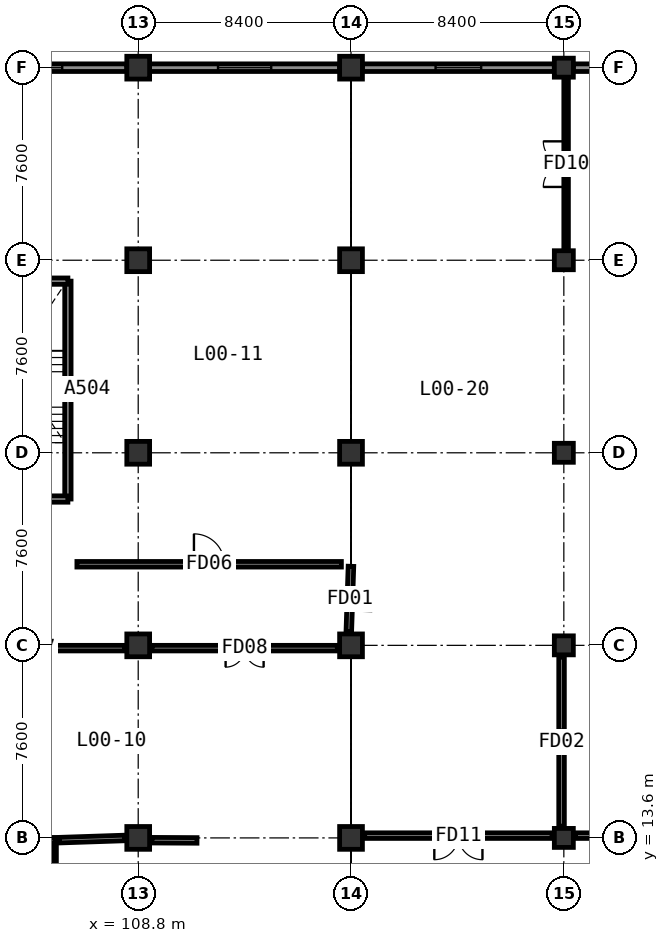
"""IFC4 building model, lengths in metres.
Left out: names, types, materials, properties, quantities, classifications, styles, units other than length and angle.
Written with IfcOpenShell. Run it as: python <this file> out.ifc"""

import sys

from ifc_helpers import new_model, si_unit, direction, frame, frame_2d, origin, origin_2d, place, context, subcontext, project, spatial, rectangle, extrude, element, fill, save


model = new_model("IFC4")
c1 = context("Model", 3, precision=1e-05, world=origin(), true_north=direction((0.0, 1.0)))
c2 = subcontext(c1, "Body", "Model", "MODEL_VIEW")
j1 = project(units=[si_unit("LENGTHUNIT", "METRE"), si_unit("PLANEANGLEUNIT", "RADIAN")], contexts=[c1])
p1 = place(None, origin())
s1 = spatial("IfcSite", under=j1, at=p1, CompositionType="ELEMENT")
p2 = place(p1, origin())
s2 = spatial("IfcBuilding", under=s1, at=p2, CompositionType="ELEMENT")
p3 = place(p2, origin())
s3 = spatial("IfcBuildingStorey", under=s2, at=p3, CompositionType="ELEMENT", Elevation=0.0)
for number, where, z_axis, x_axis in (
    (1, (108.8, 13.6, 0.0), (0.0, 0.0, 1.0), (1.0, 0.0, 0.0)),
    (2, (117.2, 13.6, 0.0), (0.0, 0.0, 1.0), (1.0, 0.0, 0.0)),
):
    element("IfcColumn", number, at=place(p3, frame(where, z_axis=z_axis, x_axis=x_axis)), inside=s3, PredefinedType="COLUMN", context=c2, shape_type="SweptSolid", body=[
        extrude(rectangle(XDim=0.9, YDim=0.9, at=origin_2d()), origin(), (0.0, 0.0, 1.0), 4.8),
    ])
p4 = place(p3, frame((125.6, 13.6, 0.0), z_axis=(0.0, 0.0, 1.0), x_axis=(1.0, 0.0, 0.0)))
e3 = element("IfcColumn", 3, at=p4, inside=s3, PredefinedType="COLUMN", context=c2, shape_type="SweptSolid", body=[
    extrude(rectangle(XDim=0.75, YDim=0.75, at=origin_2d()), origin(), (0.0, 0.0, 1.0), 4.8),
])
for number, where, z_axis, x_axis in (
    (4, (108.8, 21.2, 0.0), (0.0, 0.0, 1.0), (1.0, 0.0, 0.0)),
    (5, (117.2, 21.2, 0.0), (0.0, 0.0, 1.0), (1.0, 0.0, 0.0)),
):
    element("IfcColumn", number, at=place(p3, frame(where, z_axis=z_axis, x_axis=x_axis)), inside=s3, PredefinedType="COLUMN", context=c2, shape_type="SweptSolid", body=[
        extrude(rectangle(XDim=0.9, YDim=0.9, at=origin_2d()), origin(), (0.0, 0.0, 1.0), 4.8),
    ])
p5 = place(p3, frame((125.6, 21.2, 0.0), z_axis=(0.0, 0.0, 1.0), x_axis=(1.0, 0.0, 0.0)))
e6 = element("IfcColumn", 6, at=p5, inside=s3, PredefinedType="COLUMN", context=c2, shape_type="SweptSolid", body=[
    extrude(rectangle(XDim=0.75, YDim=0.75, at=origin_2d()), origin(), (0.0, 0.0, 1.0), 4.8),
])
for number, where, z_axis, x_axis in (
    (7, (108.8, 28.8, 0.0), (0.0, 0.0, 1.0), (1.0, 0.0, 0.0)),
    (8, (117.2, 28.8, 0.0), (0.0, 0.0, 1.0), (1.0, 0.0, 0.0)),
):
    element("IfcColumn", number, at=place(p3, frame(where, z_axis=z_axis, x_axis=x_axis)), inside=s3, PredefinedType="COLUMN", context=c2, shape_type="SweptSolid", body=[
        extrude(rectangle(XDim=0.9, YDim=0.9, at=origin_2d()), origin(), (0.0, 0.0, 1.0), 4.8),
    ])
p6 = place(p3, frame((125.6, 28.8, 0.0), z_axis=(0.0, 0.0, 1.0), x_axis=(1.0, 0.0, 0.0)))
e9 = element("IfcColumn", 9, at=p6, inside=s3, PredefinedType="COLUMN", context=c2, shape_type="SweptSolid", body=[
    extrude(rectangle(XDim=0.75, YDim=0.75, at=origin_2d()), origin(), (0.0, 0.0, 1.0), 4.8),
])
for number, where, z_axis, x_axis in (
    (10, (108.8, 36.4, 0.0), (0.0, 0.0, 1.0), (1.0, 0.0, 0.0)),
    (11, (117.2, 36.4, 0.0), (0.0, 0.0, 1.0), (1.0, 0.0, 0.0)),
):
    element("IfcColumn", number, at=place(p3, frame(where, z_axis=z_axis, x_axis=x_axis)), inside=s3, PredefinedType="COLUMN", context=c2, shape_type="SweptSolid", body=[
        extrude(rectangle(XDim=0.9, YDim=0.9, at=origin_2d()), origin(), (0.0, 0.0, 1.0), 4.8),
    ])
p7 = place(p3, frame((125.6, 36.4, 0.0), z_axis=(0.0, 0.0, 1.0), x_axis=(1.0, 0.0, 0.0)))
e12 = element("IfcColumn", 12, at=p7, inside=s3, PredefinedType="COLUMN", context=c2, shape_type="SweptSolid", body=[
    extrude(rectangle(XDim=0.75, YDim=0.75, at=origin_2d()), origin(), (0.0, 0.0, 1.0), 4.8),
])
for number, where, z_axis, x_axis in (
    (13, (108.8, 44.0, 0.0), (0.0, 0.0, 1.0), (1.0, 0.0, 0.0)),
    (14, (117.2, 44.0, 0.0), (0.0, 0.0, 1.0), (1.0, 0.0, 0.0)),
):
    element("IfcColumn", number, at=place(p3, frame(where, z_axis=z_axis, x_axis=x_axis)), inside=s3, PredefinedType="COLUMN", context=c2, shape_type="SweptSolid", body=[
        extrude(rectangle(XDim=0.9, YDim=0.9, at=origin_2d()), origin(), (0.0, 0.0, 1.0), 4.8),
    ])
p8 = place(p3, frame((125.6, 44.0, 0.0), z_axis=(0.0, 0.0, 1.0), x_axis=(1.0, 0.0, 0.0)))
e15 = element("IfcColumn", 15, at=p8, inside=s3, PredefinedType="COLUMN", context=c2, shape_type="SweptSolid", body=[
    extrude(rectangle(XDim=0.75, YDim=0.75, at=origin_2d()), origin(), (0.0, 0.0, 1.0), 4.8),
])
p9 = place(p3, frame((133.625, 44.0, 0.0), z_axis=(0.0, 0.0, 1.0), x_axis=(-1.0, 0.0, 0.0)))
e16 = element("IfcWall", 16, at=p9, inside=s3, PredefinedType="SOLIDWALL", context=c2, shape_type="SweptSolid", body=[
    extrude(rectangle(XDim=7.65, YDim=0.3, at=frame_2d((3.825, 0.0))), origin(), (0.0, 0.0, 1.0), 4.187),
])
p10 = place(p9, frame((3.0, 0.0, 0.95)))
e17 = element("IfcOpeningElement", 17, at=p10, cuts=e16, PredefinedType="OPENING", context=c2, shape_type="SweptSolid", body=[
    extrude(rectangle(XDim=1.65, YDim=1.8, at=frame_2d((0.825, 0.9))), frame((0.0, 0.16, 0.0), z_axis=(0.0, -1.0, 0.0), x_axis=(1.0, 0.0, 0.0)), (0.0, 0.0, 1.0), 0.32),
])
p11 = place(p3, frame((125.225, 44.0, 0.0), z_axis=(0.0, 0.0, 1.0), x_axis=(-1.0, 0.0, 0.0)))
e18 = element("IfcWall", 18, at=p11, inside=s3, PredefinedType="SOLIDWALL", context=c2, shape_type="SweptSolid", body=[
    extrude(rectangle(XDim=7.575, YDim=0.3, at=frame_2d((3.788, 0.0))), origin(), (0.0, 0.0, 1.0), 4.047),
])
p12 = place(p11, frame((2.887, 0.0, 0.95)))
e19 = element("IfcOpeningElement", 19, at=p12, cuts=e18, PredefinedType="OPENING", context=c2, shape_type="SweptSolid", body=[
    extrude(rectangle(XDim=1.8, YDim=1.8, at=frame_2d((0.9, 0.9))), frame((0.0, 0.16, 0.0), z_axis=(0.0, -1.0, 0.0), x_axis=(1.0, 0.0, 0.0)), (0.0, 0.0, 1.0), 0.32),
])
p13 = place(p3, frame((116.75, 44.0, 0.0), z_axis=(0.0, 0.0, 1.0), x_axis=(-1.0, 0.0, 0.0)))
e20 = element("IfcWall", 20, at=p13, inside=s3, PredefinedType="SOLIDWALL", context=c2, shape_type="SweptSolid", body=[
    extrude(rectangle(XDim=7.5, YDim=0.3, at=frame_2d((3.75, 0.0))), origin(), (0.0, 0.0, 1.0), 4.047),
])
p14 = place(p13, frame((2.7, 0.0, 0.95)))
e21 = element("IfcOpeningElement", 21, at=p14, cuts=e20, PredefinedType="OPENING", context=c2, shape_type="SweptSolid", body=[
    extrude(rectangle(XDim=2.1, YDim=1.8, at=frame_2d((1.05, 0.9))), frame((0.0, 0.16, 0.0), z_axis=(0.0, -1.0, 0.0), x_axis=(1.0, 0.0, 0.0)), (0.0, 0.0, 1.0), 0.32),
])
p15 = place(p3, frame((108.35, 44.0, 0.0), z_axis=(0.0, 0.0, 1.0), x_axis=(-1.0, 0.0, 0.0)))
e22 = element("IfcWall", 22, at=p15, inside=s3, PredefinedType="SOLIDWALL", context=c2, shape_type="SweptSolid", body=[
    extrude(rectangle(XDim=7.5, YDim=0.3, at=frame_2d((3.75, 0.0))), origin(), (0.0, 0.0, 1.0), 4.047),
])
p16 = place(p15, frame((2.55, 0.0, 0.95)))
e23 = element("IfcOpeningElement", 23, at=p16, cuts=e22, PredefinedType="OPENING", context=c2, shape_type="SweptSolid", body=[
    extrude(rectangle(XDim=2.4, YDim=1.8, at=frame_2d((1.2, 0.9))), frame((0.0, 0.16, 0.0), z_axis=(0.0, -1.0, 0.0), x_axis=(1.0, 0.0, 0.0)), (0.0, 0.0, 1.0), 0.32),
])
p17 = place(p3, frame((106.025, 26.975, 0.0), z_axis=(0.0, 0.0, 1.0), x_axis=(0.0, 1.0, 0.0)))
e24 = element("IfcWall", 24, at=p17, inside=s3, PredefinedType="SHEAR", context=c2, shape_type="SweptSolid", body=[
    extrude(rectangle(XDim=8.6, YDim=0.25, at=frame_2d((4.3, 0.0))), origin(), (0.0, 0.0, 1.0), 4.52),
])
p18 = place(p3, frame((101.575, 35.575, 0.0), z_axis=(0.0, 0.0, 1.0), x_axis=(1.0, 0.0, 0.0)))
e25 = element("IfcWall", 25, at=p18, inside=s3, PredefinedType="SHEAR", context=c2, shape_type="SweptSolid", body=[
    extrude(rectangle(XDim=4.45, YDim=0.25, at=frame_2d((2.225, 0.0))), origin(), (0.0, 0.0, 1.0), 4.52),
])
p19 = place(p3, frame((101.575, 26.975, 0.0), z_axis=(0.0, 0.0, 1.0), x_axis=(1.0, 0.0, 0.0)))
e26 = element("IfcWall", 26, at=p19, inside=s3, PredefinedType="SHEAR", context=c2, shape_type="SweptSolid", body=[
    extrude(rectangle(XDim=4.45, YDim=0.25, at=frame_2d((2.225, 0.0))), origin(), (0.0, 0.0, 1.0), 4.52),
])
p20 = place(p19, frame((1.65, 0.0, 0.0)))
e27 = element("IfcOpeningElement", 27, at=p20, cuts=e26, PredefinedType="OPENING", context=c2, shape_type="SweptSolid", body=[
    extrude(rectangle(XDim=1.1, YDim=2.1, at=frame_2d((0.55, 1.05))), frame((0.0, 0.135, 0.0), z_axis=(0.0, -1.0, 0.0), x_axis=(1.0, 0.0, 0.0)), (0.0, 0.0, 1.0), 0.27),
])
p21 = place(p3, frame((108.26, 21.09, 0.0), z_axis=(0.0, 0.0, 1.0), x_axis=(-1.0, 0.0, 0.0)))
e28 = element("IfcWall", 28, at=p21, inside=s3, PredefinedType="SOLIDWALL", context=c2, shape_type="SweptSolid", body=[
    extrude(rectangle(XDim=7.32, YDim=0.22, at=frame_2d((3.66, 0.0))), origin(), (0.0, 0.0, 1.0), 3.81),
])
p22 = place(p21, frame((2.96, 0.0, 0.0)))
e29 = element("IfcOpeningElement", 29, at=p22, cuts=e28, PredefinedType="OPENING", context=c2, shape_type="SweptSolid", body=[
    extrude(rectangle(XDim=1.4, YDim=2.15, at=frame_2d((0.7, 1.075))), frame((0.0, 0.12, 0.0), z_axis=(0.0, -1.0, 0.0), x_axis=(1.0, 0.0, 0.0)), (0.0, 0.0, 1.0), 0.24),
])
p23 = place(p3, frame((116.66, 21.09, 0.0), z_axis=(0.0, 0.0, 1.0), x_axis=(-1.0, 0.0, 0.0)))
e30 = element("IfcWall", 30, at=p23, inside=s3, PredefinedType="SOLIDWALL", context=c2, shape_type="SweptSolid", body=[
    extrude(rectangle(XDim=7.32, YDim=0.22, at=frame_2d((3.66, 0.0))), origin(), (0.0, 0.0, 1.0), 3.81),
])
p24 = place(p23, frame((2.91, 0.0, 0.0)))
e31 = element("IfcOpeningElement", 31, at=p24, cuts=e30, PredefinedType="OPENING", context=c2, shape_type="SweptSolid", body=[
    extrude(rectangle(XDim=1.5, YDim=2.15, at=frame_2d((0.75, 1.075))), frame((0.0, 0.12, 0.0), z_axis=(0.0, -1.0, 0.0), x_axis=(1.0, 0.0, 0.0)), (0.0, 0.0, 1.0), 0.24),
])
p25 = place(p3, frame((125.51, 20.735, 0.0), z_axis=(0.0, 0.0, 1.0), x_axis=(0.0, -1.0, 0.0)))
e32 = element("IfcWall", 32, at=p25, inside=s3, PredefinedType="SOLIDWALL", context=c2, shape_type="SweptSolid", body=[
    extrude(rectangle(XDim=6.67, YDim=0.22, at=frame_2d((3.335, 0.0))), origin(), (0.0, 0.0, 1.0), 3.95),
])
p26 = place(p25, frame((2.86, 0.0, 0.0)))
e33 = element("IfcOpeningElement", 33, at=p26, cuts=e32, PredefinedType="OPENING", context=c2, shape_type="SweptSolid", body=[
    extrude(rectangle(XDim=0.95, YDim=2.1, at=frame_2d((0.475, 1.05))), frame((0.0, 0.12, 0.0), z_axis=(0.0, -1.0, 0.0), x_axis=(1.0, 0.0, 0.0)), (0.0, 0.0, 1.0), 0.24),
])
p27 = place(p3, frame((133.535, 13.69, 0.0), z_axis=(0.0, 0.0, 1.0), x_axis=(-1.0, 0.0, 0.0)))
e34 = element("IfcWall", 34, at=p27, inside=s3, PredefinedType="SOLIDWALL", context=c2, shape_type="SweptSolid", body=[
    extrude(rectangle(XDim=7.47, YDim=0.22, at=frame_2d((3.735, 0.0))), origin(), (0.0, 0.0, 1.0), 4.187),
])
p28 = place(p27, frame((2.735, 0.0, 0.0)))
e35 = element("IfcOpeningElement", 35, at=p28, cuts=e34, PredefinedType="OPENING", context=c2, shape_type="SweptSolid", body=[
    extrude(rectangle(XDim=2.0, YDim=2.25, at=frame_2d((1.0, 1.125))), frame((0.0, 0.12, 0.0), z_axis=(0.0, -1.0, 0.0), x_axis=(1.0, 0.0, 0.0)), (0.0, 0.0, 1.0), 0.24),
])
p29 = place(p3, frame((106.381, 24.4, 0.0), z_axis=(0.0, 0.0, 1.0), x_axis=(1.0, 0.0, 0.0)))
e36 = element("IfcWall", 36, at=p29, inside=s3, PredefinedType="SOLIDWALL", context=c2, shape_type="SweptSolid", body=[
    extrude(rectangle(XDim=10.439, YDim=0.22, at=frame_2d((5.219, 0.0))), origin(), (0.0, 0.0, 1.0), 4.5),
])
p30 = place(p29, frame((4.619, 0.0, 0.0)))
e37 = element("IfcOpeningElement", 37, at=p30, cuts=e36, PredefinedType="OPENING", context=c2, shape_type="SweptSolid", body=[
    extrude(rectangle(XDim=1.2, YDim=2.1, at=frame_2d((0.6, 1.05))), frame((0.0, 0.12, 0.0), z_axis=(0.0, -1.0, 0.0), x_axis=(1.0, 0.0, 0.0)), (0.0, 0.0, 1.0), 0.24),
])
p31 = place(p3, frame((117.198, 24.32, 0.0), z_axis=(0.0, 0.0, 1.0), x_axis=(-0.032911759551, -0.999458261301, 0.0)))
e38 = element("IfcWall", 38, at=p31, inside=s3, PredefinedType="SOLIDWALL", context=c2, shape_type="SweptSolid", body=[
    extrude(rectangle(XDim=2.582, YDim=0.22, at=frame_2d((1.291, 0.0))), origin(), (0.0, 0.0, 1.0), 3.81),
])
p32 = place(p31, frame((0.841, 0.0, 0.0)))
e39 = element("IfcOpeningElement", 39, at=p32, cuts=e38, PredefinedType="OPENING", context=c2, shape_type="SweptSolid", body=[
    extrude(rectangle(XDim=0.9, YDim=2.1, at=frame_2d((0.45, 1.05))), frame((0.0, 0.12, 0.0), z_axis=(0.0, -1.0, 0.0), x_axis=(1.0, 0.0, 0.0)), (0.0, 0.0, 1.0), 0.24),
])
p33 = place(p3, frame((125.69, 36.865, 0.0), z_axis=(0.0, 0.0, 1.0), x_axis=(0.0, 1.0, 0.0)))
e40 = element("IfcWall", 40, at=p33, inside=s3, PredefinedType="PARTITIONING", context=c2, shape_type="SweptSolid", body=[
    extrude(rectangle(XDim=6.655, YDim=0.18, at=frame_2d((3.328, 0.0))), origin(), (0.0, 0.0, 1.0), 3.95),
])
p34 = place(p33, frame((2.427, 0.0, 0.0)))
e41 = element("IfcOpeningElement", 41, at=p34, cuts=e40, PredefinedType="OPENING", context=c2, shape_type="SweptSolid", body=[
    extrude(rectangle(XDim=1.8, YDim=2.2, at=frame_2d((0.9, 1.1))), frame((0.0, 0.1, 0.0), z_axis=(0.0, -1.0, 0.0), x_axis=(1.0, 0.0, 0.0)), (0.0, 0.0, 1.0), 0.2),
])
p35 = place(p3, frame((125.135, 13.69, 0.0), z_axis=(0.0, 0.0, 1.0), x_axis=(-1.0, 0.0, 0.0)))
e42 = element("IfcWall", 42, at=p35, inside=s3, PredefinedType="SOLIDWALL", context=c2, shape_type="SweptSolid", body=[
    extrude(rectangle(XDim=7.395, YDim=0.22, at=frame_2d((3.698, 0.0))), origin(), (0.0, 0.0, 1.0), 3.81),
])
p36 = place(p35, frame((2.748, 0.0, 0.0)))
e43 = element("IfcOpeningElement", 43, at=p36, cuts=e42, PredefinedType="OPENING", context=c2, shape_type="SweptSolid", body=[
    extrude(rectangle(XDim=1.9, YDim=2.2, at=frame_2d((0.95, 1.1))), frame((0.0, 0.12, 0.0), z_axis=(0.0, -1.0, 0.0), x_axis=(1.0, 0.0, 0.0)), (0.0, 0.0, 1.0), 0.24),
])
p37 = place(p3, frame((105.51, 13.52, 0.0), z_axis=(0.0, 0.0, 1.0), x_axis=(0.0, -1.0, 0.0)))
e44 = element("IfcWall", 44, at=p37, inside=s3, PredefinedType="PARTITIONING", context=c2, shape_type="SweptSolid", body=[
    extrude(rectangle(XDim=7.12, YDim=0.12, at=frame_2d((3.56, 0.0))), origin(), (0.0, 0.0, 1.0), 4.5),
])
p38 = place(p37, frame((2.635, 0.0, 0.0)))
e45 = element("IfcOpeningElement", 45, at=p38, cuts=e44, PredefinedType="OPENING", context=c2, shape_type="SweptSolid", body=[
    extrude(rectangle(XDim=1.85, YDim=2.22, at=frame_2d((0.925, 1.11))), frame((0.0, 0.07, 0.0), z_axis=(0.0, -1.0, 0.0), x_axis=(1.0, 0.0, 0.0)), (0.0, 0.0, 1.0), 0.14),
])
p39 = place(p3, frame((100.94, 13.51, 0.0), z_axis=(0.0, 0.0, 1.0), x_axis=(0.999999964482, -0.000266524511, 0.0)))
e46 = element("IfcWall", 46, at=p39, inside=s3, PredefinedType="SOLIDWALL", context=c2, shape_type="SweptSolid", body=[
    extrude(rectangle(XDim=4.58, YDim=0.22, at=frame_2d((2.29, 0.0))), origin(), (0.0, 0.0, 1.0), 3.81),
])
p40 = place(p3, frame((105.69, 13.511, 0.0), z_axis=(0.0, 0.0, 1.0), x_axis=(0.999441424237, 0.033419148982, 0.0)))
e47 = element("IfcWall", 47, at=p40, inside=s3, PredefinedType="SOLIDWALL", context=c2, shape_type="SweptSolid", body=[
    extrude(rectangle(XDim=2.572, YDim=0.22, at=frame_2d((1.286, 0.0))), origin(), (0.0, 0.0, 1.0), 3.81),
])
p41 = place(p3, frame((109.34, 13.51, 0.0), z_axis=(0.0, 0.0, 1.0), x_axis=(0.999988478092, -0.004800383587, 0.0)))
e48 = element("IfcWall", 48, at=p41, inside=s3, PredefinedType="SOLIDWALL", context=c2, shape_type="SweptSolid", body=[
    extrude(rectangle(XDim=1.78, YDim=0.22, at=frame_2d((0.89, 0.0))), origin(), (0.0, 0.0, 1.0), 3.81),
])
p42 = place(p12, origin())
e49 = element("IfcWindow", 49, at=p42, inside=s3, PartitioningType="DOUBLE_PANEL_VERTICAL", PredefinedType="WINDOW", context=c2, shape_type="SweptSolid", body=[
    extrude(rectangle(XDim=1.8, YDim=1.8, at=frame_2d((0.9, 0.9))), frame((0.0, 0.03, 0.0), z_axis=(0.0, -1.0, 0.0), x_axis=(1.0, 0.0, 0.0)), (0.0, 0.0, 1.0), 0.06),
])
fill(e19, e49)
p43 = place(p14, origin())
e50 = element("IfcWindow", 50, at=p43, inside=s3, PartitioningType="DOUBLE_PANEL_VERTICAL", PredefinedType="WINDOW", context=c2, shape_type="SweptSolid", body=[
    extrude(rectangle(XDim=2.1, YDim=1.8, at=frame_2d((1.05, 0.9))), frame((0.0, 0.03, 0.0), z_axis=(0.0, -1.0, 0.0), x_axis=(1.0, 0.0, 0.0)), (0.0, 0.0, 1.0), 0.06),
])
fill(e21, e50)
p44 = place(p16, origin())
e51 = element("IfcWindow", 51, at=p44, inside=s3, PartitioningType="DOUBLE_PANEL_VERTICAL", PredefinedType="WINDOW", context=c2, shape_type="SweptSolid", body=[
    extrude(rectangle(XDim=2.4, YDim=1.8, at=frame_2d((1.2, 0.9))), frame((0.0, 0.03, 0.0), z_axis=(0.0, -1.0, 0.0), x_axis=(1.0, 0.0, 0.0)), (0.0, 0.0, 1.0), 0.06),
])
fill(e23, e51)
p45 = place(p24, origin())
e52 = element("IfcDoor", 52, at=p45, inside=s3, OperationType="DOUBLE_DOOR_SINGLE_SWING", PredefinedType="DOOR", context=c2, shape_type="SweptSolid", body=[
    extrude(rectangle(XDim=1.5, YDim=2.15, at=frame_2d((0.75, 1.075))), frame((0.0, 0.025, 0.0), z_axis=(0.0, -1.0, 0.0), x_axis=(1.0, 0.0, 0.0)), (0.0, 0.0, 1.0), 0.05),
])
fill(e31, e52)
p46 = place(p26, origin())
e53 = element("IfcDoor", 53, at=p46, inside=s3, OperationType="SINGLE_SWING_RIGHT", PredefinedType="DOOR", context=c2, shape_type="SweptSolid", body=[
    extrude(rectangle(XDim=0.95, YDim=2.1, at=frame_2d((0.475, 1.05))), frame((0.0, 0.025, 0.0), z_axis=(0.0, -1.0, 0.0), x_axis=(1.0, 0.0, 0.0)), (0.0, 0.0, 1.0), 0.05),
])
fill(e33, e53)
p47 = place(p30, origin())
e54 = element("IfcDoor", 54, at=p47, inside=s3, OperationType="SINGLE_SWING_LEFT", PredefinedType="DOOR", context=c2, shape_type="SweptSolid", body=[
    extrude(rectangle(XDim=1.2, YDim=2.1, at=frame_2d((0.6, 1.05))), frame((0.0, 0.025, 0.0), z_axis=(0.0, -1.0, 0.0), x_axis=(1.0, 0.0, 0.0)), (0.0, 0.0, 1.0), 0.05),
])
fill(e37, e54)
p48 = place(p32, origin())
e55 = element("IfcDoor", 55, at=p48, inside=s3, OperationType="SINGLE_SWING_RIGHT", PredefinedType="DOOR", context=c2, shape_type="SweptSolid", body=[
    extrude(rectangle(XDim=0.9, YDim=2.1, at=frame_2d((0.45, 1.05))), frame((0.0, 0.025, 0.0), z_axis=(0.0, -1.0, 0.0), x_axis=(1.0, 0.0, 0.0)), (0.0, 0.0, 1.0), 0.05),
])
fill(e39, e55)
p49 = place(p34, origin())
e56 = element("IfcDoor", 56, at=p49, inside=s3, OperationType="DOUBLE_DOOR_SINGLE_SWING", PredefinedType="DOOR", context=c2, shape_type="SweptSolid", body=[
    extrude(rectangle(XDim=1.8, YDim=2.2, at=frame_2d((0.9, 1.1))), frame((0.0, 0.025, 0.0), z_axis=(0.0, -1.0, 0.0), x_axis=(1.0, 0.0, 0.0)), (0.0, 0.0, 1.0), 0.05),
])
fill(e41, e56)
p50 = place(p36, origin())
e57 = element("IfcDoor", 57, at=p50, inside=s3, OperationType="DOUBLE_DOOR_SINGLE_SWING", PredefinedType="DOOR", context=c2, shape_type="SweptSolid", body=[
    extrude(rectangle(XDim=1.9, YDim=2.2, at=frame_2d((0.95, 1.1))), frame((0.0, 0.025, 0.0), z_axis=(0.0, -1.0, 0.0), x_axis=(1.0, 0.0, 0.0)), (0.0, 0.0, 1.0), 0.05),
])
fill(e43, e57)
save(model, sys.argv[1])
